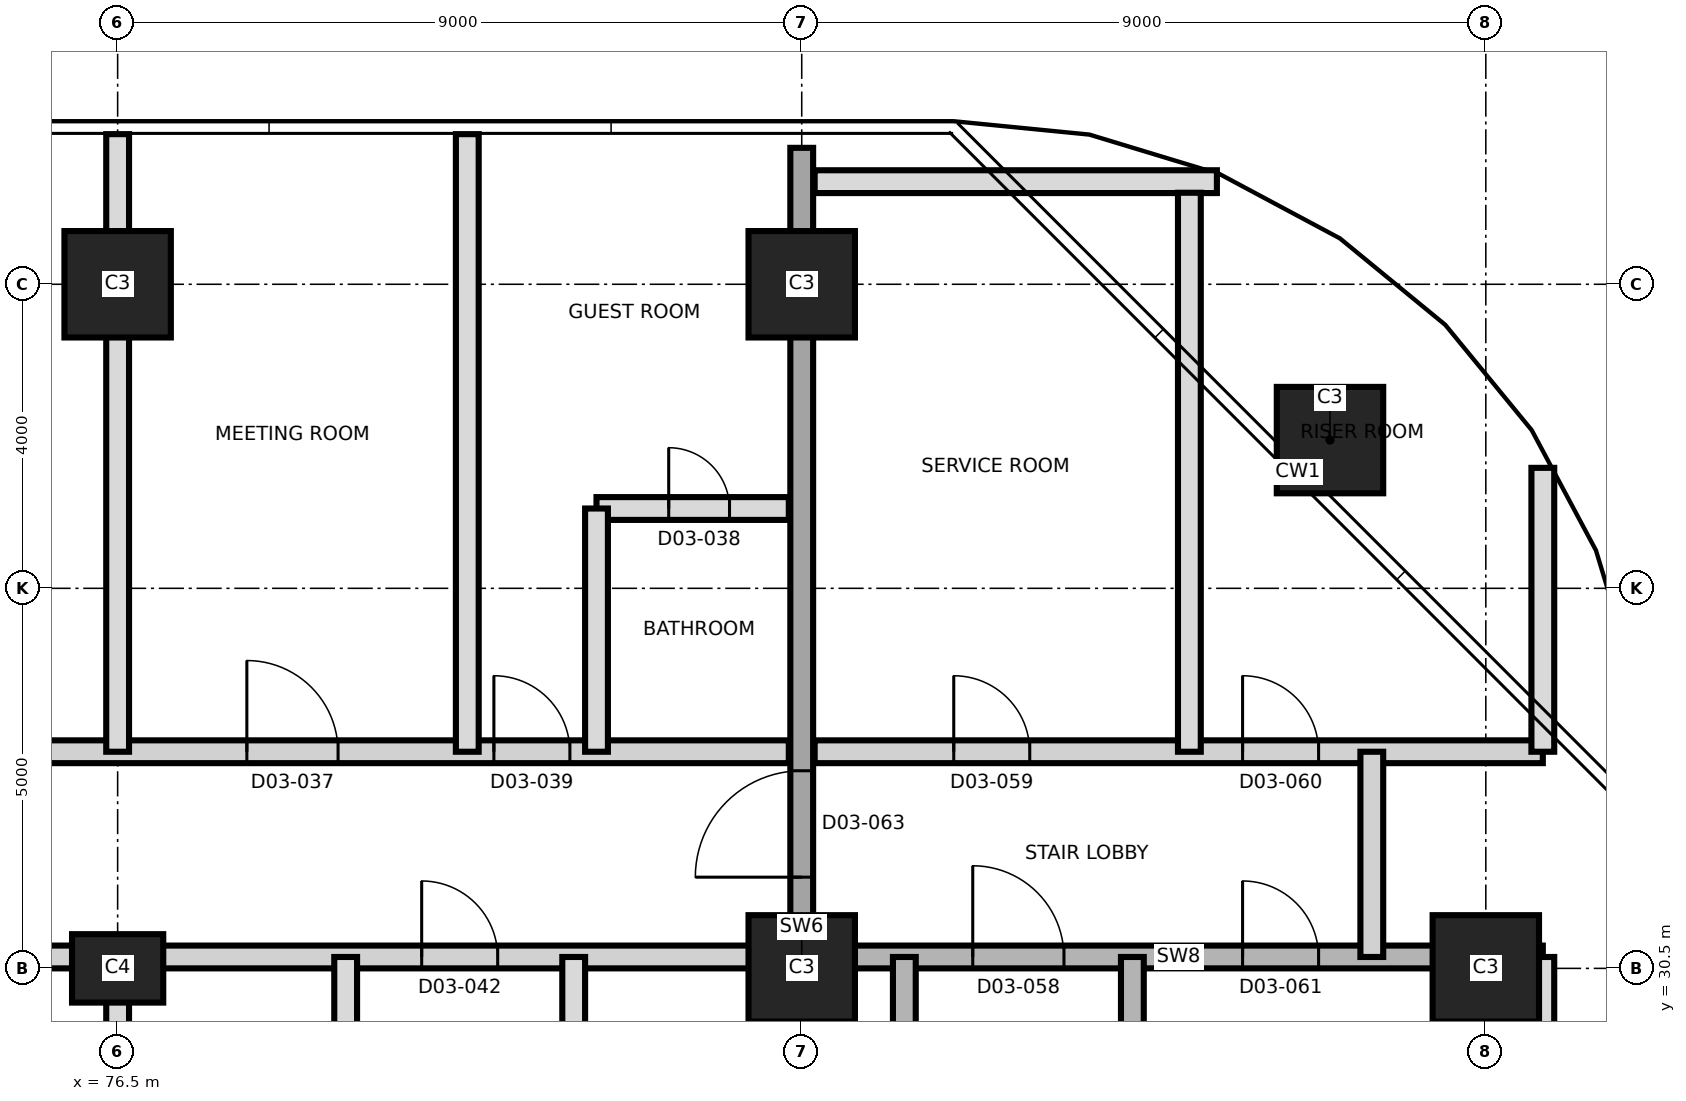
"""IFC4 building model, lengths in metres.
Left out: names, types, materials, properties, quantities, classifications, styles, units other than length and angle.
Written with IfcOpenShell. Run it as: python <this file> out.ifc"""

import sys

from ifc_helpers import new_model, si_unit, direction, frame, frame_2d, origin, origin_2d, place, context, subcontext, project, spatial, rectangle, extrude, element, fill, save


model = new_model("IFC4")
c1 = context("Model", 3, precision=1e-05, world=origin(), true_north=direction((0.0, 1.0)))
c2 = subcontext(c1, "Body", "Model", "MODEL_VIEW")
j1 = project(units=[si_unit("LENGTHUNIT", "METRE"), si_unit("PLANEANGLEUNIT", "RADIAN")], contexts=[c1])
p1 = place(None, origin())
s1 = spatial("IfcSite", under=j1, at=p1, CompositionType="ELEMENT")
p2 = place(p1, origin())
s2 = spatial("IfcBuilding", under=s1, at=p2, CompositionType="ELEMENT")
p3 = place(p2, frame((0.0, 0.0, 52.0)))
s3 = spatial("IfcBuildingStorey", under=s2, at=p3, CompositionType="ELEMENT", Elevation=52.0)
p4 = place(p3, frame((76.5, 30.5, 0.0), z_axis=(0.0, 0.0, 1.0), x_axis=(1.0, 0.0, 0.0)))
e1 = element("IfcColumn", 1, at=p4, inside=s3, PredefinedType="COLUMN", context=c2, shape_type="SweptSolid", body=[
    extrude(rectangle(XDim=1.2, YDim=0.9, at=origin_2d()), origin(), (0.0, 0.0, 1.0), 3.7),
])
for number, where, z_axis, x_axis in (
    (2, (85.5, 30.5, 0.0), (0.0, 0.0, 1.0), (1.0, 0.0, 0.0)),
    (3, (94.5, 30.5, 0.0), (0.0, 0.0, 1.0), (1.0, 0.0, 0.0)),
    (4, (92.45, 37.45, 0.0), (0.0, 0.0, 1.0), (1.0, 0.0, 0.0)),
    (5, (76.5, 39.5, 0.0), (0.0, 0.0, 1.0), (1.0, 0.0, 0.0)),
    (6, (85.5, 39.5, 0.0), (0.0, 0.0, 1.0), (1.0, 0.0, 0.0)),
):
    element("IfcColumn", number, at=place(p3, frame(where, z_axis=z_axis, x_axis=x_axis)), inside=s3, PredefinedType="COLUMN", context=c2, shape_type="SweptSolid", body=[
        extrude(rectangle(XDim=1.4, YDim=1.4, at=origin_2d()), origin(), (0.0, 0.0, 1.0), 3.7),
    ])
p5 = place(p3, frame((85.5, 19.705, 0.0), z_axis=(0.0, 0.0, 1.0), x_axis=(0.0, 1.0, 0.0)))
e7 = element("IfcWall", 7, at=p5, inside=s3, PredefinedType="SHEAR", context=c2, shape_type="SweptSolid", body=[
    extrude(rectangle(XDim=21.59, YDim=0.3, at=frame_2d((10.795, 0.0))), origin(), (0.0, 0.0, 1.0), 3.7),
])
p6 = place(p5, frame((11.995, 0.0, 0.0)))
e8 = element("IfcOpeningElement", 8, at=p6, cuts=e7, PredefinedType="OPENING", context=c2, shape_type="SweptSolid", body=[
    extrude(rectangle(XDim=1.4, YDim=2.1, at=frame_2d((0.7, 1.05))), frame((0.0, 0.16, 0.0), z_axis=(0.0, -1.0, 0.0), x_axis=(1.0, 0.0, 0.0)), (0.0, 0.0, 1.0), 0.32),
])
p7 = place(p3, frame((58.95, 30.65, 0.0), z_axis=(0.0, 0.0, 1.0), x_axis=(1.0, 0.0, 0.0)))
e9 = element("IfcWall", 9, at=p7, inside=s3, PredefinedType="PARTITIONING", context=c2, shape_type="SweptSolid", body=[
    extrude(rectangle(XDim=26.38, YDim=0.3, at=frame_2d((13.19, 0.0))), origin(), (0.0, 0.0, 1.0), 3.4),
])
p8 = place(p7, frame((0.685, 0.0, 0.0)))
e10 = element("IfcOpeningElement", 10, at=p8, cuts=e9, PredefinedType="OPENING", context=c2, shape_type="SweptSolid", body=[
    extrude(rectangle(XDim=1.2, YDim=2.1, at=frame_2d((0.6, 1.05))), frame((0.0, 0.16, 0.0), z_axis=(0.0, -1.0, 0.0), x_axis=(1.0, 0.0, 0.0)), (0.0, 0.0, 1.0), 0.32),
])
p9 = place(p7, frame((3.935, 0.0, 0.0)))
e11 = element("IfcOpeningElement", 11, at=p9, cuts=e9, PredefinedType="OPENING", context=c2, shape_type="SweptSolid", body=[
    extrude(rectangle(XDim=1.0, YDim=2.1, at=frame_2d((0.5, 1.05))), frame((0.0, 0.16, 0.0), z_axis=(0.0, -1.0, 0.0), x_axis=(1.0, 0.0, 0.0)), (0.0, 0.0, 1.0), 0.32),
])
p10 = place(p7, frame((9.685, 0.0, 0.0)))
e12 = element("IfcOpeningElement", 12, at=p10, cuts=e9, PredefinedType="OPENING", context=c2, shape_type="SweptSolid", body=[
    extrude(rectangle(XDim=1.2, YDim=2.1, at=frame_2d((0.6, 1.05))), frame((0.0, 0.16, 0.0), z_axis=(0.0, -1.0, 0.0), x_axis=(1.0, 0.0, 0.0)), (0.0, 0.0, 1.0), 0.32),
])
p11 = place(p7, frame((12.935, 0.0, 0.0)))
e13 = element("IfcOpeningElement", 13, at=p11, cuts=e9, PredefinedType="OPENING", context=c2, shape_type="SweptSolid", body=[
    extrude(rectangle(XDim=1.0, YDim=2.1, at=frame_2d((0.5, 1.05))), frame((0.0, 0.16, 0.0), z_axis=(0.0, -1.0, 0.0), x_axis=(1.0, 0.0, 0.0)), (0.0, 0.0, 1.0), 0.32),
])
p12 = place(p7, frame((21.55, 0.0, 0.0)))
e14 = element("IfcOpeningElement", 14, at=p12, cuts=e9, PredefinedType="OPENING", context=c2, shape_type="SweptSolid", body=[
    extrude(rectangle(XDim=1.0, YDim=2.4, at=frame_2d((0.5, 1.2))), frame((0.0, 0.16, 0.0), z_axis=(0.0, -1.0, 0.0), x_axis=(1.0, 0.0, 0.0)), (0.0, 0.0, 1.0), 0.32),
])
p13 = place(p3, frame((85.67, 30.65, 0.0), z_axis=(0.0, 0.0, 1.0), x_axis=(1.0, 0.0, 0.0)))
e15 = element("IfcWall", 15, at=p13, inside=s3, PredefinedType="SHEAR", context=c2, shape_type="SweptSolid", body=[
    extrude(rectangle(XDim=9.58, YDim=0.3, at=frame_2d((4.79, 0.0))), origin(), (0.0, 0.0, 1.0), 3.4),
])
p14 = place(p13, frame((2.08, 0.0, 0.0)))
e16 = element("IfcOpeningElement", 16, at=p14, cuts=e15, PredefinedType="OPENING", context=c2, shape_type="SweptSolid", body=[
    extrude(rectangle(XDim=1.2, YDim=2.1, at=frame_2d((0.6, 1.05))), frame((0.0, 0.16, 0.0), z_axis=(0.0, -1.0, 0.0), x_axis=(1.0, 0.0, 0.0)), (0.0, 0.0, 1.0), 0.32),
])
p15 = place(p13, frame((5.63, 0.0, 0.0)))
e17 = element("IfcOpeningElement", 17, at=p15, cuts=e15, PredefinedType="OPENING", context=c2, shape_type="SweptSolid", body=[
    extrude(rectangle(XDim=1.0, YDim=2.1, at=frame_2d((0.5, 1.05))), frame((0.0, 0.16, 0.0), z_axis=(0.0, -1.0, 0.0), x_axis=(1.0, 0.0, 0.0)), (0.0, 0.0, 1.0), 0.32),
])
p16 = place(p3, frame((58.95, 33.35, 0.0), z_axis=(0.0, 0.0, 1.0), x_axis=(1.0, 0.0, 0.0)))
e18 = element("IfcWall", 18, at=p16, inside=s3, PredefinedType="PARTITIONING", context=c2, shape_type="SweptSolid", body=[
    extrude(rectangle(XDim=26.38, YDim=0.3, at=frame_2d((13.19, 0.0))), origin(), (0.0, 0.0, 1.0), 3.4),
])
p17 = place(p16, frame((0.685, 0.0, 0.0)))
e19 = element("IfcOpeningElement", 19, at=p17, cuts=e18, PredefinedType="OPENING", context=c2, shape_type="SweptSolid", body=[
    extrude(rectangle(XDim=1.2, YDim=2.1, at=frame_2d((0.6, 1.05))), frame((0.0, 0.16, 0.0), z_axis=(0.0, -1.0, 0.0), x_axis=(1.0, 0.0, 0.0)), (0.0, 0.0, 1.0), 0.32),
])
p18 = place(p16, frame((3.935, 0.0, 0.0)))
e20 = element("IfcOpeningElement", 20, at=p18, cuts=e18, PredefinedType="OPENING", context=c2, shape_type="SweptSolid", body=[
    extrude(rectangle(XDim=1.0, YDim=2.1, at=frame_2d((0.5, 1.05))), frame((0.0, 0.16, 0.0), z_axis=(0.0, -1.0, 0.0), x_axis=(1.0, 0.0, 0.0)), (0.0, 0.0, 1.0), 0.32),
])
p19 = place(p16, frame((14.2, 0.0, 0.0)))
e21 = element("IfcOpeningElement", 21, at=p19, cuts=e18, PredefinedType="OPENING", context=c2, shape_type="SweptSolid", body=[
    extrude(rectangle(XDim=1.0, YDim=2.4, at=frame_2d((0.5, 1.2))), frame((0.0, 0.16, 0.0), z_axis=(0.0, -1.0, 0.0), x_axis=(1.0, 0.0, 0.0)), (0.0, 0.0, 1.0), 0.32),
])
p20 = place(p16, frame((19.25, 0.0, 0.0)))
e22 = element("IfcOpeningElement", 22, at=p20, cuts=e18, PredefinedType="OPENING", context=c2, shape_type="SweptSolid", body=[
    extrude(rectangle(XDim=1.2, YDim=2.1, at=frame_2d((0.6, 1.05))), frame((0.0, 0.16, 0.0), z_axis=(0.0, -1.0, 0.0), x_axis=(1.0, 0.0, 0.0)), (0.0, 0.0, 1.0), 0.32),
])
p21 = place(p16, frame((22.5, 0.0, 0.0)))
e23 = element("IfcOpeningElement", 23, at=p21, cuts=e18, PredefinedType="OPENING", context=c2, shape_type="SweptSolid", body=[
    extrude(rectangle(XDim=1.0, YDim=2.1, at=frame_2d((0.5, 1.05))), frame((0.0, 0.16, 0.0), z_axis=(0.0, -1.0, 0.0), x_axis=(1.0, 0.0, 0.0)), (0.0, 0.0, 1.0), 0.32),
])
p22 = place(p3, frame((85.67, 33.35, 0.0), z_axis=(0.0, 0.0, 1.0), x_axis=(1.0, 0.0, 0.0)))
e24 = element("IfcWall", 24, at=p22, inside=s3, PredefinedType="PARTITIONING", context=c2, shape_type="SweptSolid", body=[
    extrude(rectangle(XDim=9.58, YDim=0.3, at=frame_2d((4.79, 0.0))), origin(), (0.0, 0.0, 1.0), 3.4),
])
p23 = place(p22, frame((1.83, 0.0, 0.0)))
e25 = element("IfcOpeningElement", 25, at=p23, cuts=e24, PredefinedType="OPENING", context=c2, shape_type="SweptSolid", body=[
    extrude(rectangle(XDim=1.0, YDim=2.1, at=frame_2d((0.5, 1.05))), frame((0.0, 0.16, 0.0), z_axis=(0.0, -1.0, 0.0), x_axis=(1.0, 0.0, 0.0)), (0.0, 0.0, 1.0), 0.32),
])
p24 = place(p22, frame((5.63, 0.0, 0.0)))
e26 = element("IfcOpeningElement", 26, at=p24, cuts=e24, PredefinedType="OPENING", context=c2, shape_type="SweptSolid", body=[
    extrude(rectangle(XDim=1.0, YDim=2.1, at=frame_2d((0.5, 1.05))), frame((0.0, 0.16, 0.0), z_axis=(0.0, -1.0, 0.0), x_axis=(1.0, 0.0, 0.0)), (0.0, 0.0, 1.0), 0.32),
])
p25 = place(p3, frame((82.8, 36.55, 0.0), z_axis=(0.0, 0.0, 1.0), x_axis=(1.0, 0.0, 0.0)))
e27 = element("IfcWall", 27, at=p25, inside=s3, PredefinedType="PARTITIONING", context=c2, shape_type="SweptSolid", body=[
    extrude(rectangle(XDim=2.53, YDim=0.3, at=frame_2d((1.265, 0.0))), origin(), (0.0, 0.0, 1.0), 3.4),
])
p26 = place(p25, frame((0.95, 0.0, 0.0)))
e28 = element("IfcOpeningElement", 28, at=p26, cuts=e27, PredefinedType="OPENING", context=c2, shape_type="SweptSolid", body=[
    extrude(rectangle(XDim=0.8, YDim=2.1, at=frame_2d((0.4, 1.05))), frame((0.0, 0.16, 0.0), z_axis=(0.0, -1.0, 0.0), x_axis=(1.0, 0.0, 0.0)), (0.0, 0.0, 1.0), 0.32),
])
p27 = place(p3, frame((85.67, 40.85, 0.0), z_axis=(0.0, 0.0, 1.0), x_axis=(1.0, 0.0, 0.0)))
e29 = element("IfcWall", 29, at=p27, inside=s3, PredefinedType="PARTITIONING", context=c2, shape_type="SweptSolid", body=[
    extrude(rectangle(XDim=5.292, YDim=0.3, at=frame_2d((2.646, 0.0))), origin(), (0.0, 0.0, 1.0), 3.4),
])
p28 = place(p3, frame((76.5, 19.705, 0.0), z_axis=(0.0, 0.0, 1.0), x_axis=(0.0, 1.0, 0.0)))
e30 = element("IfcWall", 30, at=p28, inside=s3, PredefinedType="PARTITIONING", context=c2, shape_type="SweptSolid", body=[
    extrude(rectangle(XDim=10.945, YDim=0.3, at=frame_2d((5.472, 0.0))), origin(), (0.0, 0.0, 1.0), 3.4),
])
p29 = place(p3, frame((76.5, 33.35, 0.0), z_axis=(0.0, 0.0, 1.0), x_axis=(0.0, 1.0, 0.0)))
e31 = element("IfcWall", 31, at=p29, inside=s3, PredefinedType="PARTITIONING", context=c2, shape_type="SweptSolid", body=[
    extrude(rectangle(XDim=8.125, YDim=0.3, at=frame_2d((4.062, 0.0))), origin(), (0.0, 0.0, 1.0), 3.4),
])
p30 = place(p3, frame((79.5, 27.35, 0.0), z_axis=(0.0, 0.0, 1.0), x_axis=(0.0, 1.0, 0.0)))
e32 = element("IfcWall", 32, at=p30, inside=s3, PredefinedType="PARTITIONING", context=c2, shape_type="SweptSolid", body=[
    extrude(rectangle(XDim=3.3, YDim=0.3, at=frame_2d((1.65, 0.0))), origin(), (0.0, 0.0, 1.0), 3.4),
])
p31 = place(p3, frame((81.1, 33.35, 0.0), z_axis=(0.0, 0.0, 1.0), x_axis=(0.0, 1.0, 0.0)))
e33 = element("IfcWall", 33, at=p31, inside=s3, PredefinedType="PARTITIONING", context=c2, shape_type="SweptSolid", body=[
    extrude(rectangle(XDim=8.125, YDim=0.3, at=frame_2d((4.062, 0.0))), origin(), (0.0, 0.0, 1.0), 3.4),
])
p32 = place(p3, frame((82.5, 27.35, 0.0), z_axis=(0.0, 0.0, 1.0), x_axis=(0.0, 1.0, 0.0)))
e34 = element("IfcWall", 34, at=p32, inside=s3, PredefinedType="PARTITIONING", context=c2, shape_type="SweptSolid", body=[
    extrude(rectangle(XDim=3.3, YDim=0.3, at=frame_2d((1.65, 0.0))), origin(), (0.0, 0.0, 1.0), 3.4),
])
p33 = place(p3, frame((82.8, 33.35, 0.0), z_axis=(0.0, 0.0, 1.0), x_axis=(0.0, 1.0, 0.0)))
e35 = element("IfcWall", 35, at=p33, inside=s3, PredefinedType="PARTITIONING", context=c2, shape_type="SweptSolid", body=[
    extrude(rectangle(XDim=3.2, YDim=0.3, at=frame_2d((1.6, 0.0))), origin(), (0.0, 0.0, 1.0), 3.4),
])
for number, where, z_axis, x_axis in (
    (36, (86.85, 21.8, 0.0), (0.0, 0.0, 1.0), (0.0, 1.0, 0.0)),
    (37, (89.85, 21.8, 0.0), (0.0, 0.0, 1.0), (0.0, 1.0, 0.0)),
):
    element("IfcWall", number, at=place(p3, frame(where, z_axis=z_axis, x_axis=x_axis)), inside=s3, PredefinedType="SHEAR", context=c2, shape_type="SweptSolid", body=[
        extrude(rectangle(XDim=8.85, YDim=0.3, at=frame_2d((4.425, 0.0))), origin(), (0.0, 0.0, 1.0), 3.4),
    ])
p34 = place(p3, frame((90.6, 33.35, 0.0), z_axis=(0.0, 0.0, 1.0), x_axis=(0.0, 1.0, 0.0)))
e38 = element("IfcWall", 38, at=p34, inside=s3, PredefinedType="PARTITIONING", context=c2, shape_type="SweptSolid", body=[
    extrude(rectangle(XDim=7.354, YDim=0.3, at=frame_2d((3.677, 0.0))), origin(), (0.0, 0.0, 1.0), 3.4),
])
p35 = place(p3, frame((93.0, 30.65, 0.0), z_axis=(0.0, 0.0, 1.0), x_axis=(0.0, 1.0, 0.0)))
e39 = element("IfcWall", 39, at=p35, inside=s3, PredefinedType="PARTITIONING", context=c2, shape_type="SweptSolid", body=[
    extrude(rectangle(XDim=2.7, YDim=0.3, at=frame_2d((1.35, 0.0))), origin(), (0.0, 0.0, 1.0), 3.4),
])
p36 = place(p3, frame((95.25, 23.915, 0.0), z_axis=(0.0, 0.0, 1.0), x_axis=(0.0, 1.0, 0.0)))
e40 = element("IfcWall", 40, at=p36, inside=s3, PredefinedType="PARTITIONING", context=c2, shape_type="SweptSolid", body=[
    extrude(rectangle(XDim=6.735, YDim=0.3, at=frame_2d((3.367, 0.0))), origin(), (0.0, 0.0, 1.0), 3.4),
])
p37 = place(p3, frame((95.25, 33.35, 0.0), z_axis=(0.0, 0.0, 1.0), x_axis=(0.0, 1.0, 0.0)))
e41 = element("IfcWall", 41, at=p37, inside=s3, PredefinedType="PARTITIONING", context=c2, shape_type="SweptSolid", body=[
    extrude(rectangle(XDim=3.735, YDim=0.3, at=frame_2d((1.867, 0.0))), origin(), (0.0, 0.0, 1.0), 3.4),
])
p38 = place(p20, origin())
e42 = element("IfcDoor", 42, at=p38, inside=s3, OperationType="SINGLE_SWING_RIGHT", PredefinedType="DOOR", context=c2, shape_type="SweptSolid", body=[
    extrude(rectangle(XDim=1.2, YDim=2.1, at=frame_2d((0.6, 1.05))), frame((0.0, 0.025, 0.0), z_axis=(0.0, -1.0, 0.0), x_axis=(1.0, 0.0, 0.0)), (0.0, 0.0, 1.0), 0.05),
])
fill(e22, e42)
p39 = place(p26, origin())
e43 = element("IfcDoor", 43, at=p39, inside=s3, OperationType="SINGLE_SWING_LEFT", PredefinedType="DOOR", context=c2, shape_type="SweptSolid", body=[
    extrude(rectangle(XDim=0.8, YDim=2.1, at=frame_2d((0.4, 1.05))), frame((0.0, 0.025, 0.0), z_axis=(0.0, -1.0, 0.0), x_axis=(1.0, 0.0, 0.0)), (0.0, 0.0, 1.0), 0.05),
])
fill(e28, e43)
p40 = place(p21, origin())
e44 = element("IfcDoor", 44, at=p40, inside=s3, OperationType="SINGLE_SWING_LEFT", PredefinedType="DOOR", context=c2, shape_type="SweptSolid", body=[
    extrude(rectangle(XDim=1.0, YDim=2.1, at=frame_2d((0.5, 1.05))), frame((0.0, 0.025, 0.0), z_axis=(0.0, -1.0, 0.0), x_axis=(1.0, 0.0, 0.0)), (0.0, 0.0, 1.0), 0.05),
])
fill(e23, e44)
p41 = place(p12, origin())
e45 = element("IfcDoor", 45, at=p41, inside=s3, OperationType="SINGLE_SWING_RIGHT", PredefinedType="DOOR", context=c2, shape_type="SweptSolid", body=[
    extrude(rectangle(XDim=1.0, YDim=2.4, at=frame_2d((0.5, 1.2))), frame((0.0, 0.025, 0.0), z_axis=(0.0, -1.0, 0.0), x_axis=(1.0, 0.0, 0.0)), (0.0, 0.0, 1.0), 0.05),
])
fill(e14, e45)
p42 = place(p14, origin())
e46 = element("IfcDoor", 46, at=p42, inside=s3, OperationType="SINGLE_SWING_LEFT", PredefinedType="DOOR", context=c2, shape_type="SweptSolid", body=[
    extrude(rectangle(XDim=1.2, YDim=2.1, at=frame_2d((0.6, 1.05))), frame((0.0, 0.025, 0.0), z_axis=(0.0, -1.0, 0.0), x_axis=(1.0, 0.0, 0.0)), (0.0, 0.0, 1.0), 0.05),
])
fill(e16, e46)
p43 = place(p23, origin())
e47 = element("IfcDoor", 47, at=p43, inside=s3, OperationType="SINGLE_SWING_LEFT", PredefinedType="DOOR", context=c2, shape_type="SweptSolid", body=[
    extrude(rectangle(XDim=1.0, YDim=2.1, at=frame_2d((0.5, 1.05))), frame((0.0, 0.025, 0.0), z_axis=(0.0, -1.0, 0.0), x_axis=(1.0, 0.0, 0.0)), (0.0, 0.0, 1.0), 0.05),
])
fill(e25, e47)
p44 = place(p24, origin())
e48 = element("IfcDoor", 48, at=p44, inside=s3, OperationType="SINGLE_SWING_RIGHT", PredefinedType="DOOR", context=c2, shape_type="SweptSolid", body=[
    extrude(rectangle(XDim=1.0, YDim=2.1, at=frame_2d((0.5, 1.05))), frame((0.0, 0.025, 0.0), z_axis=(0.0, -1.0, 0.0), x_axis=(1.0, 0.0, 0.0)), (0.0, 0.0, 1.0), 0.05),
])
fill(e26, e48)
p45 = place(p15, origin())
e49 = element("IfcDoor", 49, at=p45, inside=s3, OperationType="SINGLE_SWING_LEFT", PredefinedType="DOOR", context=c2, shape_type="SweptSolid", body=[
    extrude(rectangle(XDim=1.0, YDim=2.1, at=frame_2d((0.5, 1.05))), frame((0.0, 0.025, 0.0), z_axis=(0.0, -1.0, 0.0), x_axis=(1.0, 0.0, 0.0)), (0.0, 0.0, 1.0), 0.05),
])
fill(e17, e49)
p46 = place(p6, origin())
e50 = element("IfcDoor", 50, at=p46, inside=s3, OperationType="SINGLE_SWING_RIGHT", PredefinedType="DOOR", context=c2, shape_type="SweptSolid", body=[
    extrude(rectangle(XDim=1.4, YDim=2.1, at=frame_2d((0.7, 1.05))), frame((0.0, 0.025, 0.0), z_axis=(0.0, -1.0, 0.0), x_axis=(1.0, 0.0, 0.0)), (0.0, 0.0, 1.0), 0.05),
])
fill(e8, e50)
save(model, sys.argv[1])
